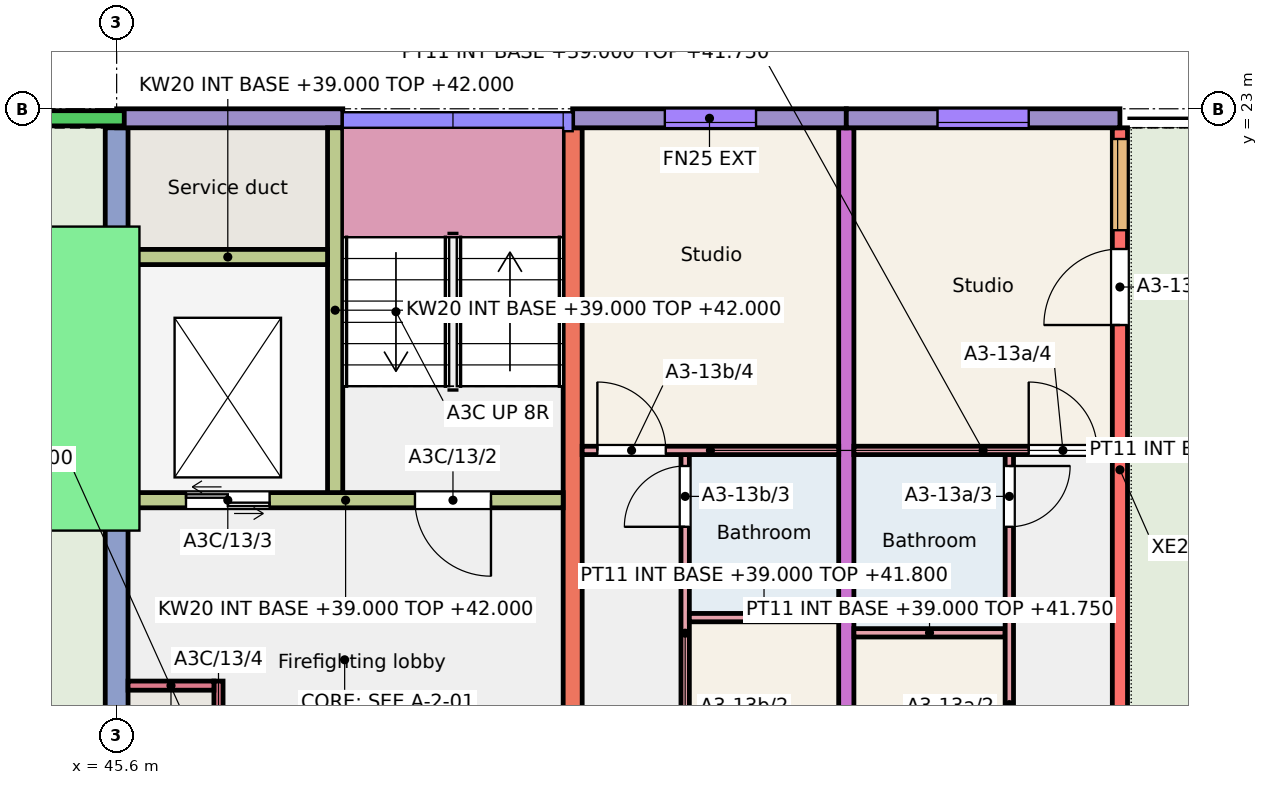
"""IFC4 building model, lengths in metres.
Left out: names, types, materials, properties, quantities, classifications, styles, units other than length and angle.
Written with IfcOpenShell. Run it as: python <this file> out.ifc"""

import sys

from ifc_helpers import new_model, si_unit, direction, frame, frame_2d, origin, place, context, subcontext, project, spatial, rectangle, extrude, element, fill, save


model = new_model("IFC4")
c1 = context("Model", 3, precision=1e-05, world=origin(), true_north=direction((0.0, 1.0)))
c2 = subcontext(c1, "Body", "Model", "MODEL_VIEW")
j1 = project(units=[si_unit("LENGTHUNIT", "METRE"), si_unit("PLANEANGLEUNIT", "RADIAN")], contexts=[c1])
p1 = place(None, origin())
s1 = spatial("IfcSite", under=j1, at=p1, CompositionType="ELEMENT")
p2 = place(p1, origin())
s2 = spatial("IfcBuilding", under=s1, at=p2, CompositionType="ELEMENT")
p3 = place(p2, frame((0.0, 0.0, 39.0)))
s3 = spatial("IfcBuildingStorey", under=s2, at=p3, CompositionType="ELEMENT", Elevation=39.0)
p4 = place(p3, frame((45.6, 11.75, 0.0), z_axis=(0.0, 0.0, 1.0), x_axis=(0.0, 1.0, 0.0)))
e1 = element("IfcWall", 1, at=p4, inside=s3, PredefinedType="SHEAR", context=c2, shape_type="SweptSolid", body=[
    extrude(rectangle(XDim=11.0, YDim=0.3, at=frame_2d((5.5, 0.0))), origin(), (0.0, 0.0, 1.0), 3.0),
])
p5 = place(p4, frame((0.3, 0.0, 0.0)))
e2 = element("IfcOpeningElement", 2, at=p5, cuts=e1, PredefinedType="OPENING", context=c2, shape_type="SweptSolid", body=[
    extrude(rectangle(XDim=1.2, YDim=2.1, at=frame_2d((0.6, 1.05))), frame((0.0, 0.16, 0.0), z_axis=(0.0, -1.0, 0.0), x_axis=(1.0, 0.0, 0.0)), (0.0, 0.0, 1.0), 0.32),
])
p6 = place(p3, frame((51.6, 13.75, 0.0), z_axis=(0.0, 0.0, 1.0), x_axis=(0.0, 1.0, 0.0)))
e3 = element("IfcWall", 3, at=p6, inside=s3, PredefinedType="SHEAR", context=c2, shape_type="SweptSolid", body=[
    extrude(rectangle(XDim=9.0, YDim=0.25, at=frame_2d((4.5, 0.0))), origin(), (0.0, 0.0, 1.0), 3.0),
])
p7 = place(p3, frame((55.2, 13.75, 0.0), z_axis=(0.0, 0.0, 1.0), x_axis=(0.0, 1.0, 0.0)))
e4 = element("IfcWall", 4, at=p7, inside=s3, PredefinedType="SHEAR", context=c2, shape_type="SweptSolid", body=[
    extrude(rectangle(XDim=9.0, YDim=0.2, at=frame_2d((4.5, 0.0))), origin(), (0.0, 0.0, 1.0), 3.0),
])
p8 = place(p3, frame((58.8, 13.75, 0.0), z_axis=(0.0, 0.0, 1.0), x_axis=(0.0, 1.0, 0.0)))
e5 = element("IfcWall", 5, at=p8, inside=s3, PredefinedType="SHEAR", context=c2, shape_type="SweptSolid", body=[
    extrude(rectangle(XDim=9.0, YDim=0.2, at=frame_2d((4.5, 0.0))), origin(), (0.0, 0.0, 1.0), 3.0),
])
p9 = place(p8, frame((7.653, 0.0, 0.9)))
e6 = element("IfcOpeningElement", 6, at=p9, cuts=e5, PredefinedType="OPENING", context=c2, shape_type="SweptSolid", body=[
    extrude(rectangle(XDim=1.2, YDim=1.5, at=frame_2d((0.6, 0.75))), frame((0.0, 0.11, 0.0), z_axis=(0.0, -1.0, 0.0), x_axis=(1.0, 0.0, 0.0)), (0.0, 0.0, 1.0), 0.22),
])
p10 = place(p8, frame((6.405, 0.0, 0.0)))
e7 = element("IfcOpeningElement", 7, at=p10, cuts=e5, PredefinedType="OPENING", context=c2, shape_type="SweptSolid", body=[
    extrude(rectangle(XDim=1.0, YDim=2.1, at=frame_2d((0.5, 1.05))), frame((0.0, 0.11, 0.0), z_axis=(0.0, -1.0, 0.0), x_axis=(1.0, 0.0, 0.0)), (0.0, 0.0, 1.0), 0.22),
])
p11 = place(p3, frame((45.6, 22.875, 0.0), z_axis=(0.0, 0.0, 1.0), x_axis=(1.0, 0.0, 0.0)))
e8 = element("IfcWall", 8, at=p11, inside=s3, PredefinedType="SOLIDWALL", context=c2, shape_type="SweptSolid", body=[
    extrude(rectangle(XDim=2.975, YDim=0.25, at=frame_2d((1.487, 0.0))), origin(), (0.0, 0.0, 1.0), 3.0),
])
p12 = place(p3, frame((45.75, 17.85, 0.0), z_axis=(0.0, 0.0, 1.0), x_axis=(1.0, 0.0, 0.0)))
e9 = element("IfcWall", 9, at=p12, inside=s3, PredefinedType="SHEAR", context=c2, shape_type="SweptSolid", body=[
    extrude(rectangle(XDim=5.725, YDim=0.2, at=frame_2d((2.863, 0.0))), origin(), (0.0, 0.0, 1.0), 3.0),
])
p13 = place(p12, frame((3.775, 0.0, 0.0)))
e10 = element("IfcOpeningElement", 10, at=p13, cuts=e9, PredefinedType="OPENING", context=c2, shape_type="SweptSolid", body=[
    extrude(rectangle(XDim=1.0, YDim=2.1, at=frame_2d((0.5, 1.05))), frame((0.0, 0.11, 0.0), z_axis=(0.0, -1.0, 0.0), x_axis=(1.0, 0.0, 0.0)), (0.0, 0.0, 1.0), 0.22),
])
p14 = place(p12, frame((0.762, 0.0, 0.0)))
e11 = element("IfcOpeningElement", 11, at=p14, cuts=e9, PredefinedType="OPENING", context=c2, shape_type="SweptSolid", body=[
    extrude(rectangle(XDim=1.1, YDim=2.1, at=frame_2d((0.55, 1.05))), frame((0.0, 0.11, 0.0), z_axis=(0.0, -1.0, 0.0), x_axis=(1.0, 0.0, 0.0)), (0.0, 0.0, 1.0), 0.22),
])
p15 = place(p3, frame((48.475, 17.95, 0.0), z_axis=(0.0, 0.0, 1.0), x_axis=(0.0, 1.0, 0.0)))
e12 = element("IfcWall", 12, at=p15, inside=s3, PredefinedType="SHEAR", context=c2, shape_type="SweptSolid", body=[
    extrude(rectangle(XDim=4.8, YDim=0.2, at=frame_2d((2.4, 0.0))), origin(), (0.0, 0.0, 1.0), 3.0),
])
p16 = place(p3, frame((45.75, 21.05, 0.0), z_axis=(0.0, 0.0, 1.0), x_axis=(1.0, 0.0, 0.0)))
e13 = element("IfcWall", 13, at=p16, inside=s3, PredefinedType="SHEAR", context=c2, shape_type="SweptSolid", body=[
    extrude(rectangle(XDim=2.625, YDim=0.2, at=frame_2d((1.312, 0.0))), origin(), (0.0, 0.0, 1.0), 3.0),
])
p17 = place(p3, frame((46.94, 13.75, 0.0), z_axis=(0.0, 0.0, 1.0), x_axis=(0.0, 1.0, 0.0)))
e14 = element("IfcWall", 14, at=p17, inside=s3, PredefinedType="SHEAR", context=c2, shape_type="SweptSolid", body=[
    extrude(rectangle(XDim=1.72, YDim=0.12, at=frame_2d((0.86, 0.0))), origin(), (0.0, 0.0, 1.0), 3.0),
])
p18 = place(p17, frame((0.45, 0.0, 0.0)))
e15 = element("IfcOpeningElement", 15, at=p18, cuts=e14, PredefinedType="OPENING", context=c2, shape_type="SweptSolid", body=[
    extrude(rectangle(XDim=0.9, YDim=2.1, at=frame_2d((0.45, 1.05))), frame((0.0, 0.07, 0.0), z_axis=(0.0, -1.0, 0.0), x_axis=(1.0, 0.0, 0.0)), (0.0, 0.0, 1.0), 0.14),
])
p19 = place(p3, frame((45.75, 15.41, 0.0), z_axis=(0.0, 0.0, 1.0), x_axis=(1.0, 0.0, 0.0)))
e16 = element("IfcWall", 16, at=p19, inside=s3, PredefinedType="SHEAR", context=c2, shape_type="SweptSolid", body=[
    extrude(rectangle(XDim=1.13, YDim=0.12, at=frame_2d((0.565, 0.0))), origin(), (0.0, 0.0, 1.0), 3.0),
])
p20 = place(p3, frame((51.6, 22.875, 0.0), z_axis=(0.0, 0.0, 1.0), x_axis=(1.0, 0.0, 0.0)))
e17 = element("IfcWall", 17, at=p20, inside=s3, PredefinedType="SOLIDWALL", context=c2, shape_type="SweptSolid", body=[
    extrude(rectangle(XDim=3.6, YDim=0.25, at=frame_2d((1.8, 0.0))), origin(), (0.0, 0.0, 1.0), 3.0),
])
p21 = place(p20, frame((1.212, 0.0, 0.8)))
e18 = element("IfcOpeningElement", 18, at=p21, cuts=e17, PredefinedType="OPENING", context=c2, shape_type="SweptSolid", body=[
    extrude(rectangle(XDim=1.2, YDim=1.6, at=frame_2d((0.6, 0.8))), frame((0.0, 0.135, 0.0), z_axis=(0.0, -1.0, 0.0), x_axis=(1.0, 0.0, 0.0)), (0.0, 0.0, 1.0), 0.27),
])
p22 = place(p3, frame((55.2, 22.875, 0.0), z_axis=(0.0, 0.0, 1.0), x_axis=(1.0, 0.0, 0.0)))
e19 = element("IfcWall", 19, at=p22, inside=s3, PredefinedType="SOLIDWALL", context=c2, shape_type="SweptSolid", body=[
    extrude(rectangle(XDim=3.6, YDim=0.25, at=frame_2d((1.8, 0.0))), origin(), (0.0, 0.0, 1.0), 3.0),
])
p23 = place(p22, frame((1.2, 0.0, 0.8)))
e20 = element("IfcOpeningElement", 20, at=p23, cuts=e19, PredefinedType="OPENING", context=c2, shape_type="SweptSolid", body=[
    extrude(rectangle(XDim=1.2, YDim=1.6, at=frame_2d((0.6, 0.8))), frame((0.0, 0.135, 0.0), z_axis=(0.0, -1.0, 0.0), x_axis=(1.0, 0.0, 0.0)), (0.0, 0.0, 1.0), 0.27),
])
for number, where, z_axis, x_axis in (
    (21, (42.625, 17.85, 0.0), (0.0, 0.0, 1.0), (1.0, 0.0, 0.0)),
    (22, (42.625, 21.05, 0.0), (0.0, 0.0, 1.0), (1.0, 0.0, 0.0)),
):
    element("IfcWall", number, at=place(p3, frame(where, z_axis=z_axis, x_axis=x_axis)), inside=s3, PredefinedType="SHEAR", context=c2, shape_type="SweptSolid", body=[
        extrude(rectangle(XDim=2.825, YDim=0.2, at=frame_2d((1.413, 0.0))), origin(), (0.0, 0.0, 1.0), 1.5),
    ])
p24 = place(p3, frame((39.5, 22.875, 0.0), z_axis=(0.0, 0.0, 1.0), x_axis=(1.0, 0.0, 0.0)))
e23 = element("IfcWall", 23, at=p24, inside=s3, PredefinedType="PARAPET", context=c2, shape_type="SweptSolid", body=[
    extrude(rectangle(XDim=6.2, YDim=0.2, at=frame_2d((3.1, 0.0))), origin(), (0.0, 0.0, 1.0), 1.1),
])
p25 = place(p3, frame((55.3, 16.105, 0.0), z_axis=(0.0, 0.0, 1.0), x_axis=(1.0, 0.0, 0.0)))
e24 = element("IfcWall", 24, at=p25, inside=s3, PredefinedType="PARTITIONING", context=c2, shape_type="SweptSolid", body=[
    extrude(rectangle(XDim=1.99, YDim=0.11, at=frame_2d((0.995, 0.0))), origin(), (0.0, 0.0, 1.0), 2.75),
])
p26 = place(p3, frame((57.345, 13.75, 0.0), z_axis=(0.0, 0.0, 1.0), x_axis=(0.0, 1.0, 0.0)))
e25 = element("IfcWall", 25, at=p26, inside=s3, PredefinedType="PARTITIONING", context=c2, shape_type="SweptSolid", body=[
    extrude(rectangle(XDim=4.7, YDim=0.11, at=frame_2d((2.35, 0.0))), origin(), (0.0, 0.0, 1.0), 2.75),
])
p27 = place(p26, frame((0.2, 0.0, 0.0)))
e26 = element("IfcOpeningElement", 26, at=p27, cuts=e25, PredefinedType="OPENING", context=c2, shape_type="SweptSolid", body=[
    extrude(rectangle(XDim=0.8, YDim=2.1, at=frame_2d((0.4, 1.05))), frame((0.0, 0.065, 0.0), z_axis=(0.0, -1.0, 0.0), x_axis=(1.0, 0.0, 0.0)), (0.0, 0.0, 1.0), 0.13),
])
p28 = place(p26, frame((3.75, 0.0, 0.0)))
e27 = element("IfcOpeningElement", 27, at=p28, cuts=e25, PredefinedType="OPENING", context=c2, shape_type="SweptSolid", body=[
    extrude(rectangle(XDim=0.8, YDim=2.1, at=frame_2d((0.4, 1.05))), frame((0.0, 0.065, 0.0), z_axis=(0.0, -1.0, 0.0), x_axis=(1.0, 0.0, 0.0)), (0.0, 0.0, 1.0), 0.13),
])
p29 = place(p3, frame((55.3, 18.505, 0.0), z_axis=(0.0, 0.0, 1.0), x_axis=(1.0, 0.0, 0.0)))
e28 = element("IfcWall", 28, at=p29, inside=s3, PredefinedType="PARTITIONING", context=c2, shape_type="SweptSolid", body=[
    extrude(rectangle(XDim=3.4, YDim=0.11, at=frame_2d((1.7, 0.0))), origin(), (0.0, 0.0, 1.0), 2.75),
])
p30 = place(p29, frame((2.3, 0.0, 0.0)))
e29 = element("IfcOpeningElement", 29, at=p30, cuts=e28, PredefinedType="OPENING", context=c2, shape_type="SweptSolid", body=[
    extrude(rectangle(XDim=0.9, YDim=2.1, at=frame_2d((0.45, 1.05))), frame((0.0, 0.065, 0.0), z_axis=(0.0, -1.0, 0.0), x_axis=(1.0, 0.0, 0.0)), (0.0, 0.0, 1.0), 0.13),
])
p31 = place(p3, frame((53.08, 13.75, 0.0), z_axis=(0.0, 0.0, 1.0), x_axis=(0.0, 1.0, 0.0)))
e30 = element("IfcWall", 30, at=p31, inside=s3, PredefinedType="PARTITIONING", context=c2, shape_type="SweptSolid", body=[
    extrude(rectangle(XDim=4.7, YDim=0.11, at=frame_2d((2.35, 0.0))), origin(), (0.0, 0.0, 1.0), 2.8),
])
p32 = place(p31, frame((0.2, 0.0, 0.0)))
e31 = element("IfcOpeningElement", 31, at=p32, cuts=e30, PredefinedType="OPENING", context=c2, shape_type="SweptSolid", body=[
    extrude(rectangle(XDim=0.8, YDim=2.1, at=frame_2d((0.4, 1.05))), frame((0.0, 0.065, 0.0), z_axis=(0.0, -1.0, 0.0), x_axis=(1.0, 0.0, 0.0)), (0.0, 0.0, 1.0), 0.13),
])
p33 = place(p31, frame((3.75, 0.0, 0.0)))
e32 = element("IfcOpeningElement", 32, at=p33, cuts=e30, PredefinedType="OPENING", context=c2, shape_type="SweptSolid", body=[
    extrude(rectangle(XDim=0.8, YDim=2.1, at=frame_2d((0.4, 1.05))), frame((0.0, 0.065, 0.0), z_axis=(0.0, -1.0, 0.0), x_axis=(1.0, 0.0, 0.0)), (0.0, 0.0, 1.0), 0.13),
])
p34 = place(p3, frame((53.135, 16.305, 0.0), z_axis=(0.0, 0.0, 1.0), x_axis=(1.0, 0.0, 0.0)))
e33 = element("IfcWall", 33, at=p34, inside=s3, PredefinedType="PARTITIONING", context=c2, shape_type="SweptSolid", body=[
    extrude(rectangle(XDim=1.965, YDim=0.11, at=frame_2d((0.982, 0.0))), origin(), (0.0, 0.0, 1.0), 2.8),
])
p35 = place(p3, frame((51.725, 18.505, 0.0), z_axis=(0.0, 0.0, 1.0), x_axis=(1.0, 0.0, 0.0)))
e34 = element("IfcWall", 34, at=p35, inside=s3, PredefinedType="PARTITIONING", context=c2, shape_type="SweptSolid", body=[
    extrude(rectangle(XDim=3.375, YDim=0.11, at=frame_2d((1.688, 0.0))), origin(), (0.0, 0.0, 1.0), 2.8),
])
p36 = place(p35, frame((0.2, 0.0, 0.0)))
e35 = element("IfcOpeningElement", 35, at=p36, cuts=e34, PredefinedType="OPENING", context=c2, shape_type="SweptSolid", body=[
    extrude(rectangle(XDim=0.9, YDim=2.1, at=frame_2d((0.45, 1.05))), frame((0.0, 0.065, 0.0), z_axis=(0.0, -1.0, 0.0), x_axis=(1.0, 0.0, 0.0)), (0.0, 0.0, 1.0), 0.13),
])
p37 = place(p23, origin())
e36 = element("IfcWindow", 36, at=p37, inside=s3, PartitioningType="SINGLE_PANEL", PredefinedType="WINDOW", context=c2, shape_type="SweptSolid", body=[
    extrude(rectangle(XDim=1.2, YDim=1.6, at=frame_2d((0.6, 0.8))), frame((0.0, -0.025, 0.0), z_axis=(0.0, -1.0, 0.0), x_axis=(1.0, 0.0, 0.0)), (0.0, 0.0, 1.0), 0.06),
])
fill(e20, e36)
p38 = place(p9, origin())
e37 = element("IfcWindow", 37, at=p38, inside=s3, PartitioningType="SINGLE_PANEL", PredefinedType="WINDOW", context=c2, shape_type="SweptSolid", body=[
    extrude(rectangle(XDim=1.2, YDim=1.5, at=frame_2d((0.6, 0.75))), frame((0.0, 0.06, 0.0), z_axis=(0.0, -1.0, 0.0), x_axis=(1.0, 0.0, 0.0)), (0.0, 0.0, 1.0), 0.06),
])
fill(e6, e37)
p39 = place(p21, origin())
e38 = element("IfcWindow", 38, at=p39, inside=s3, PartitioningType="SINGLE_PANEL", PredefinedType="WINDOW", context=c2, shape_type="SweptSolid", body=[
    extrude(rectangle(XDim=1.2, YDim=1.6, at=frame_2d((0.6, 0.8))), frame((0.0, -0.025, 0.0), z_axis=(0.0, -1.0, 0.0), x_axis=(1.0, 0.0, 0.0)), (0.0, 0.0, 1.0), 0.06),
])
fill(e18, e38)
p40 = place(p28, origin())
e39 = element("IfcDoor", 39, at=p40, inside=s3, OperationType="SINGLE_SWING_RIGHT", PredefinedType="DOOR", context=c2, shape_type="SweptSolid", body=[
    extrude(rectangle(XDim=0.8, YDim=2.1, at=frame_2d((0.4, 1.05))), frame((0.0, 0.025, 0.0), z_axis=(0.0, -1.0, 0.0), x_axis=(1.0, 0.0, 0.0)), (0.0, 0.0, 1.0), 0.05),
])
fill(e27, e39)
p41 = place(p30, origin())
e40 = element("IfcDoor", 40, at=p41, inside=s3, OperationType="SINGLE_SWING_LEFT", PredefinedType="DOOR", context=c2, shape_type="SweptSolid", body=[
    extrude(rectangle(XDim=0.9, YDim=2.1, at=frame_2d((0.45, 1.05))), frame((0.0, 0.025, 0.0), z_axis=(0.0, -1.0, 0.0), x_axis=(1.0, 0.0, 0.0)), (0.0, 0.0, 1.0), 0.05),
])
fill(e29, e40)
p42 = place(p10, origin())
e41 = element("IfcDoor", 41, at=p42, inside=s3, OperationType="SINGLE_SWING_LEFT", PredefinedType="DOOR", context=c2, shape_type="SweptSolid", body=[
    extrude(rectangle(XDim=1.0, YDim=2.1, at=frame_2d((0.5, 1.05))), frame((0.0, 0.025, 0.0), z_axis=(0.0, -1.0, 0.0), x_axis=(1.0, 0.0, 0.0)), (0.0, 0.0, 1.0), 0.05),
])
fill(e7, e41)
p43 = place(p33, origin())
e42 = element("IfcDoor", 42, at=p43, inside=s3, OperationType="SINGLE_SWING_LEFT", PredefinedType="DOOR", context=c2, shape_type="SweptSolid", body=[
    extrude(rectangle(XDim=0.8, YDim=2.1, at=frame_2d((0.4, 1.05))), frame((0.0, 0.025, 0.0), z_axis=(0.0, -1.0, 0.0), x_axis=(1.0, 0.0, 0.0)), (0.0, 0.0, 1.0), 0.05),
])
fill(e32, e42)
p44 = place(p36, origin())
e43 = element("IfcDoor", 43, at=p44, inside=s3, OperationType="SINGLE_SWING_LEFT", PredefinedType="DOOR", context=c2, shape_type="SweptSolid", body=[
    extrude(rectangle(XDim=0.9, YDim=2.1, at=frame_2d((0.45, 1.05))), frame((0.0, 0.025, 0.0), z_axis=(0.0, -1.0, 0.0), x_axis=(1.0, 0.0, 0.0)), (0.0, 0.0, 1.0), 0.05),
])
fill(e35, e43)
p45 = place(p13, origin())
e44 = element("IfcDoor", 44, at=p45, inside=s3, OperationType="SINGLE_SWING_RIGHT", PredefinedType="DOOR", context=c2, shape_type="SweptSolid", body=[
    extrude(rectangle(XDim=1.0, YDim=2.1, at=frame_2d((0.5, 1.05))), frame((0.0, 0.025, 0.0), z_axis=(0.0, -1.0, 0.0), x_axis=(1.0, 0.0, 0.0)), (0.0, 0.0, 1.0), 0.05),
])
fill(e10, e44)
p46 = place(p14, origin())
e45 = element("IfcDoor", 45, at=p46, inside=s3, OperationType="DOUBLE_DOOR_SLIDING", PredefinedType="DOOR", context=c2, shape_type="SweptSolid", body=[
    extrude(rectangle(XDim=1.1, YDim=2.1, at=frame_2d((0.55, 1.05))), frame((0.0, 0.025, 0.0), z_axis=(0.0, -1.0, 0.0), x_axis=(1.0, 0.0, 0.0)), (0.0, 0.0, 1.0), 0.05),
])
fill(e11, e45)
save(model, sys.argv[1])
